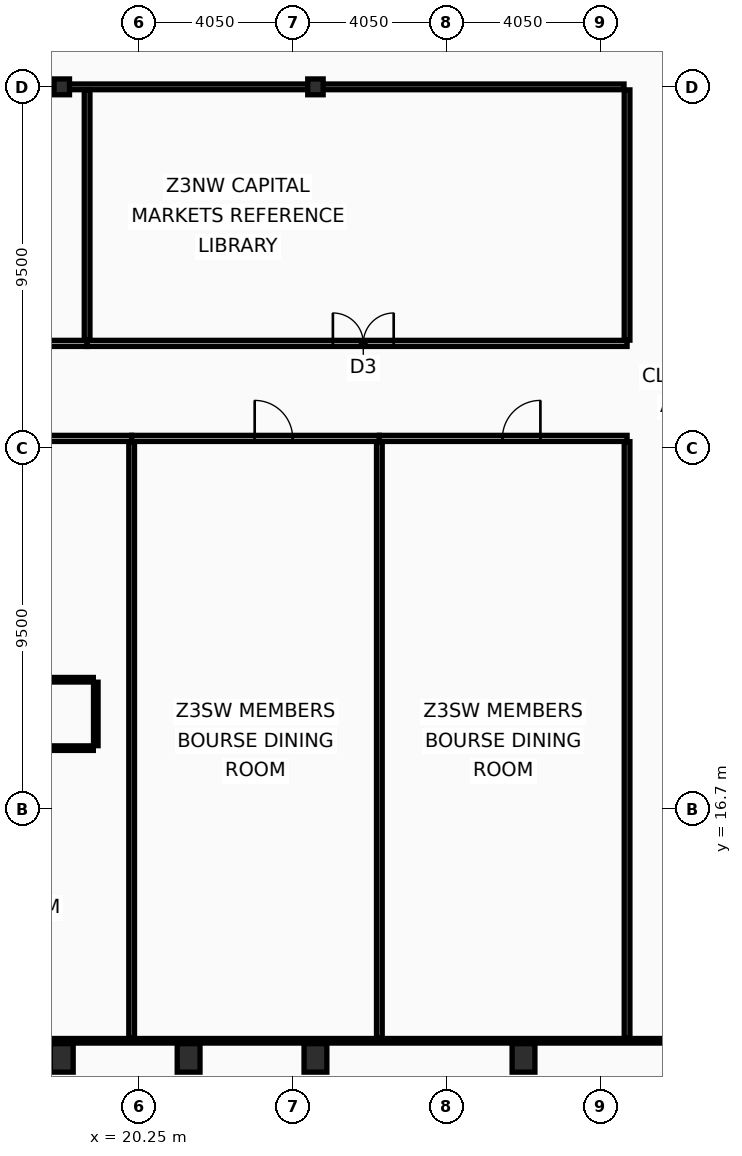
"""IFC4 building model, lengths in metres.
Left out: names, types, materials, properties, quantities, classifications, styles, units other than length and angle.
Written with IfcOpenShell. Run it as: python <this file> out.ifc"""

import sys

from ifc_helpers import new_model, si_unit, direction, frame, frame_2d, origin, origin_2d, place, context, subcontext, project, spatial, rectangle, hollow_rectangle, i_section, extrude, element, fill, save


model = new_model("IFC4")
c1 = context("Model", 3, precision=1e-05, world=origin(), true_north=direction((0.0, 1.0)))
c2 = subcontext(c1, "Body", "Model", "MODEL_VIEW")
j1 = project(units=[si_unit("LENGTHUNIT", "METRE"), si_unit("PLANEANGLEUNIT", "RADIAN")], contexts=[c1])
p1 = place(None, origin())
s1 = spatial("IfcSite", under=j1, at=p1, CompositionType="ELEMENT")
p2 = place(p1, origin())
s2 = spatial("IfcBuilding", under=s1, at=p2, CompositionType="ELEMENT")
p3 = place(p2, frame((0.0, 0.0, 235.4)))
s3 = spatial("IfcBuildingStorey", under=s2, at=p3, CompositionType="ELEMENT", Elevation=235.4)
for number, where, z_axis, x_axis in (
    (1, (18.225, 10.15, 0.0), (0.0, 0.0, 1.0), (1.0, 0.0, 0.0)),
    (2, (21.562, 10.15, 0.0), (0.0, 0.0, 1.0), (1.0, 0.0, 0.0)),
    (3, (24.9, 10.15, 0.0), (0.0, 0.0, 1.0), (1.0, 0.0, 0.0)),
    (4, (30.375, 10.15, 0.0), (0.0, 0.0, 1.0), (1.0, 0.0, 0.0)),
):
    element("IfcColumn", number, at=place(p3, frame(where, z_axis=z_axis, x_axis=x_axis)), inside=s3, PredefinedType="COLUMN", context=c2, shape_type="SweptSolid", body=[
        extrude(hollow_rectangle(XDim=0.6, YDim=0.75, WallThickness=0.045, at=origin_2d()), origin(), (0.0, 0.0, 1.0), 3.6),
    ])
for number, where, z_axis, x_axis in (
    (5, (18.225, 35.7, 0.0), (0.0, 0.0, 1.0), (1.0, 0.0, 0.0)),
    (6, (24.9, 35.7, 0.0), (0.0, 0.0, 1.0), (1.0, 0.0, 0.0)),
):
    element("IfcColumn", number, at=place(p3, frame(where, z_axis=z_axis, x_axis=x_axis)), inside=s3, PredefinedType="COLUMN", context=c2, shape_type="SweptSolid", body=[
        extrude(i_section(OverallWidth=0.406, OverallDepth=0.416, WebThickness=0.03, FlangeThickness=0.048, at=origin_2d()), origin(), (0.0, 0.0, 1.0), 3.6),
    ])
p4 = place(p3, frame((33.1, 10.665, 0.0), z_axis=(0.0, 0.0, 1.0), x_axis=(0.0, 1.0, 0.0)))
e7 = element("IfcWall", 7, at=p4, inside=s3, PredefinedType="PARTITIONING", context=c2, shape_type="SweptSolid", body=[
    extrude(rectangle(XDim=15.7, YDim=0.15, at=frame_2d((7.85, 0.0))), origin(), (0.0, 0.0, 1.0), 2.98),
])
p5 = place(p3, frame((33.1, 29.035, 0.0), z_axis=(0.0, 0.0, 1.0), x_axis=(0.0, 1.0, 0.0)))
e8 = element("IfcWall", 8, at=p5, inside=s3, PredefinedType="PARTITIONING", context=c2, shape_type="SweptSolid", body=[
    extrude(rectangle(XDim=6.585, YDim=0.15, at=frame_2d((3.292, 0.0))), origin(), (0.0, 0.0, 1.0), 2.98),
])
p6 = place(p3, frame((8.095, 35.7, 0.0), z_axis=(0.0, 0.0, 1.0), x_axis=(1.0, 0.0, 0.0)))
e9 = element("IfcWall", 9, at=p6, inside=s3, PredefinedType="PARTITIONING", context=c2, shape_type="SweptSolid", body=[
    extrude(rectangle(XDim=24.925, YDim=0.15, at=frame_2d((12.462, 0.0))), origin(), (0.0, 0.0, 1.0), 2.09),
])
p7 = place(p3, frame((8.03, 26.45, 0.0), z_axis=(0.0, 0.0, 1.0), x_axis=(1.0, 0.0, 0.0)))
e10 = element("IfcWall", 10, at=p7, inside=s3, PredefinedType="PARTITIONING", context=c2, shape_type="SweptSolid", body=[
    extrude(rectangle(XDim=12.034, YDim=0.16, at=frame_2d((6.017, 0.0))), origin(), (0.0, 0.0, 1.0), 2.53),
])
p8 = place(p7, frame((5.554, 0.0, 0.0)))
e11 = element("IfcOpeningElement", 11, at=p8, cuts=e10, PredefinedType="OPENING", context=c2, shape_type="SweptSolid", body=[
    extrude(rectangle(XDim=1.0, YDim=2.05, at=frame_2d((0.5, 1.025))), frame((0.0, 0.09, 0.0), z_axis=(0.0, -1.0, 0.0), x_axis=(1.0, 0.0, 0.0)), (0.0, 0.0, 1.0), 0.18),
])
p9 = place(p3, frame((20.064, 26.45, 0.0), z_axis=(0.0, 0.0, 1.0), x_axis=(1.0, 0.0, 0.0)))
e12 = element("IfcWall", 12, at=p9, inside=s3, PredefinedType="PARTITIONING", context=c2, shape_type="SweptSolid", body=[
    extrude(rectangle(XDim=6.518, YDim=0.16, at=frame_2d((3.259, 0.0))), origin(), (0.0, 0.0, 1.0), 2.78),
])
p10 = place(p9, frame((3.238, 0.0, 0.0)))
e13 = element("IfcOpeningElement", 13, at=p10, cuts=e12, PredefinedType="OPENING", context=c2, shape_type="SweptSolid", body=[
    extrude(rectangle(XDim=1.0, YDim=2.05, at=frame_2d((0.5, 1.025))), frame((0.0, 0.09, 0.0), z_axis=(0.0, -1.0, 0.0), x_axis=(1.0, 0.0, 0.0)), (0.0, 0.0, 1.0), 0.18),
])
p11 = place(p3, frame((20.064, 10.665, 0.0), z_axis=(0.0, 0.0, 1.0), x_axis=(0.0, 1.0, 0.0)))
e14 = element("IfcWall", 14, at=p11, inside=s3, PredefinedType="PARTITIONING", context=c2, shape_type="SweptSolid", body=[
    extrude(rectangle(XDim=15.7, YDim=0.15, at=frame_2d((7.85, 0.0))), origin(), (0.0, 0.0, 1.0), 2.98),
])
p12 = place(p3, frame((26.582, 26.45, 0.0), z_axis=(0.0, 0.0, 1.0), x_axis=(1.0, 0.0, 0.0)))
e15 = element("IfcWall", 15, at=p12, inside=s3, PredefinedType="PARTITIONING", context=c2, shape_type="SweptSolid", body=[
    extrude(rectangle(XDim=6.518, YDim=0.16, at=frame_2d((3.259, 0.0))), origin(), (0.0, 0.0, 1.0), 2.78),
])
p13 = place(p12, frame((3.238, 0.0, 0.0)))
e16 = element("IfcOpeningElement", 16, at=p13, cuts=e15, PredefinedType="OPENING", context=c2, shape_type="SweptSolid", body=[
    extrude(rectangle(XDim=1.0, YDim=2.05, at=frame_2d((0.5, 1.025))), frame((0.0, 0.09, 0.0), z_axis=(0.0, -1.0, 0.0), x_axis=(1.0, 0.0, 0.0)), (0.0, 0.0, 1.0), 0.18),
])
p14 = place(p3, frame((26.582, 10.665, 0.0), z_axis=(0.0, 0.0, 1.0), x_axis=(0.0, 1.0, 0.0)))
e17 = element("IfcWall", 17, at=p14, inside=s3, PredefinedType="PARTITIONING", context=c2, shape_type="SweptSolid", body=[
    extrude(rectangle(XDim=15.7, YDim=0.15, at=frame_2d((7.85, 0.0))), origin(), (0.0, 0.0, 1.0), 2.98),
])
p15 = place(p3, frame((8.03, 28.95, 0.0), z_axis=(0.0, 0.0, 1.0), x_axis=(1.0, 0.0, 0.0)))
e18 = element("IfcWall", 18, at=p15, inside=s3, PredefinedType="PARTITIONING", context=c2, shape_type="SweptSolid", body=[
    extrude(rectangle(XDim=10.862, YDim=0.16, at=frame_2d((5.431, 0.0))), origin(), (0.0, 0.0, 1.0), 2.53),
])
p16 = place(p15, frame((5.062, 0.0, 0.0)))
e19 = element("IfcOpeningElement", 19, at=p16, cuts=e18, PredefinedType="OPENING", context=c2, shape_type="SweptSolid", body=[
    extrude(rectangle(XDim=1.0, YDim=2.05, at=frame_2d((0.5, 1.025))), frame((0.0, 0.09, 0.0), z_axis=(0.0, -1.0, 0.0), x_axis=(1.0, 0.0, 0.0)), (0.0, 0.0, 1.0), 0.18),
])
p17 = place(p3, frame((18.892, 28.95, 0.0), z_axis=(0.0, 0.0, 1.0), x_axis=(1.0, 0.0, 0.0)))
e20 = element("IfcWall", 20, at=p17, inside=s3, PredefinedType="PARTITIONING", context=c2, shape_type="SweptSolid", body=[
    extrude(rectangle(XDim=14.208, YDim=0.16, at=frame_2d((7.104, 0.0))), origin(), (0.0, 0.0, 1.0), 2.78),
])
p18 = place(p17, frame((6.468, 0.0, 0.0)))
e21 = element("IfcOpeningElement", 21, at=p18, cuts=e20, PredefinedType="OPENING", context=c2, shape_type="SweptSolid", body=[
    extrude(rectangle(XDim=1.6, YDim=2.15, at=frame_2d((0.8, 1.075))), frame((0.0, 0.09, 0.0), z_axis=(0.0, -1.0, 0.0), x_axis=(1.0, 0.0, 0.0)), (0.0, 0.0, 1.0), 0.18),
])
p19 = place(p3, frame((18.892, 29.035, 0.0), z_axis=(0.0, 0.0, 1.0), x_axis=(0.0, 1.0, 0.0)))
e22 = element("IfcWall", 22, at=p19, inside=s3, PredefinedType="PARTITIONING", context=c2, shape_type="SweptSolid", body=[
    extrude(rectangle(XDim=6.585, YDim=0.15, at=frame_2d((3.292, 0.0))), origin(), (0.0, 0.0, 1.0), 2.98),
])
p20 = place(p3, frame((8.095, 10.6, 0.0), z_axis=(0.0, 0.0, 1.0), x_axis=(1.0, 0.0, 0.0)))
e23 = element("IfcWall", 23, at=p20, inside=s3, PredefinedType="PARTITIONING", context=c2, shape_type="SweptSolid", body=[
    extrude(rectangle(XDim=56.71, YDim=0.12, at=frame_2d((28.355, 0.0))), origin(), (0.0, 0.0, 1.0), 2.09),
])
for number, where, z_axis, x_axis in (
    (24, (8.095, 18.3, 0.0), (0.0, 0.0, 1.0), (1.0, 0.0, 0.0)),
    (25, (8.095, 20.1, 0.0), (0.0, 0.0, 1.0), (1.0, 0.0, 0.0)),
):
    element("IfcWall", number, at=place(p3, frame(where, z_axis=z_axis, x_axis=x_axis)), inside=s3, PredefinedType="PARTITIONING", context=c2, shape_type="SweptSolid", body=[
        extrude(rectangle(XDim=10.96, YDim=0.12, at=frame_2d((5.48, 0.0))), origin(), (0.0, 0.0, 1.0), 2.53),
    ])
p21 = place(p3, frame((19.12, 18.365, 0.0), z_axis=(0.0, 0.0, 1.0), x_axis=(0.0, 1.0, 0.0)))
e26 = element("IfcWall", 26, at=p21, inside=s3, PredefinedType="PARTITIONING", context=c2, shape_type="SweptSolid", body=[
    extrude(rectangle(XDim=1.67, YDim=0.12, at=frame_2d((0.835, 0.0))), origin(), (0.0, 0.0, 1.0), 3.44),
])
p22 = place(p10, origin())
e27 = element("IfcDoor", 27, at=p22, inside=s3, OperationType="SINGLE_SWING_LEFT", PredefinedType="DOOR", context=c2, shape_type="SweptSolid", body=[
    extrude(rectangle(XDim=1.0, YDim=2.05, at=frame_2d((0.5, 1.025))), frame((0.0, 0.025, 0.0), z_axis=(0.0, -1.0, 0.0), x_axis=(1.0, 0.0, 0.0)), (0.0, 0.0, 1.0), 0.05),
])
fill(e13, e27)
p23 = place(p13, origin())
e28 = element("IfcDoor", 28, at=p23, inside=s3, OperationType="SINGLE_SWING_RIGHT", PredefinedType="DOOR", context=c2, shape_type="SweptSolid", body=[
    extrude(rectangle(XDim=1.0, YDim=2.05, at=frame_2d((0.5, 1.025))), frame((0.0, 0.025, 0.0), z_axis=(0.0, -1.0, 0.0), x_axis=(1.0, 0.0, 0.0)), (0.0, 0.0, 1.0), 0.05),
])
fill(e16, e28)
p24 = place(p18, origin())
e29 = element("IfcDoor", 29, at=p24, inside=s3, OperationType="DOUBLE_DOOR_SINGLE_SWING", PredefinedType="DOOR", context=c2, shape_type="SweptSolid", body=[
    extrude(rectangle(XDim=1.6, YDim=2.15, at=frame_2d((0.8, 1.075))), frame((0.0, 0.025, 0.0), z_axis=(0.0, -1.0, 0.0), x_axis=(1.0, 0.0, 0.0)), (0.0, 0.0, 1.0), 0.05),
])
fill(e21, e29)
save(model, sys.argv[1])
